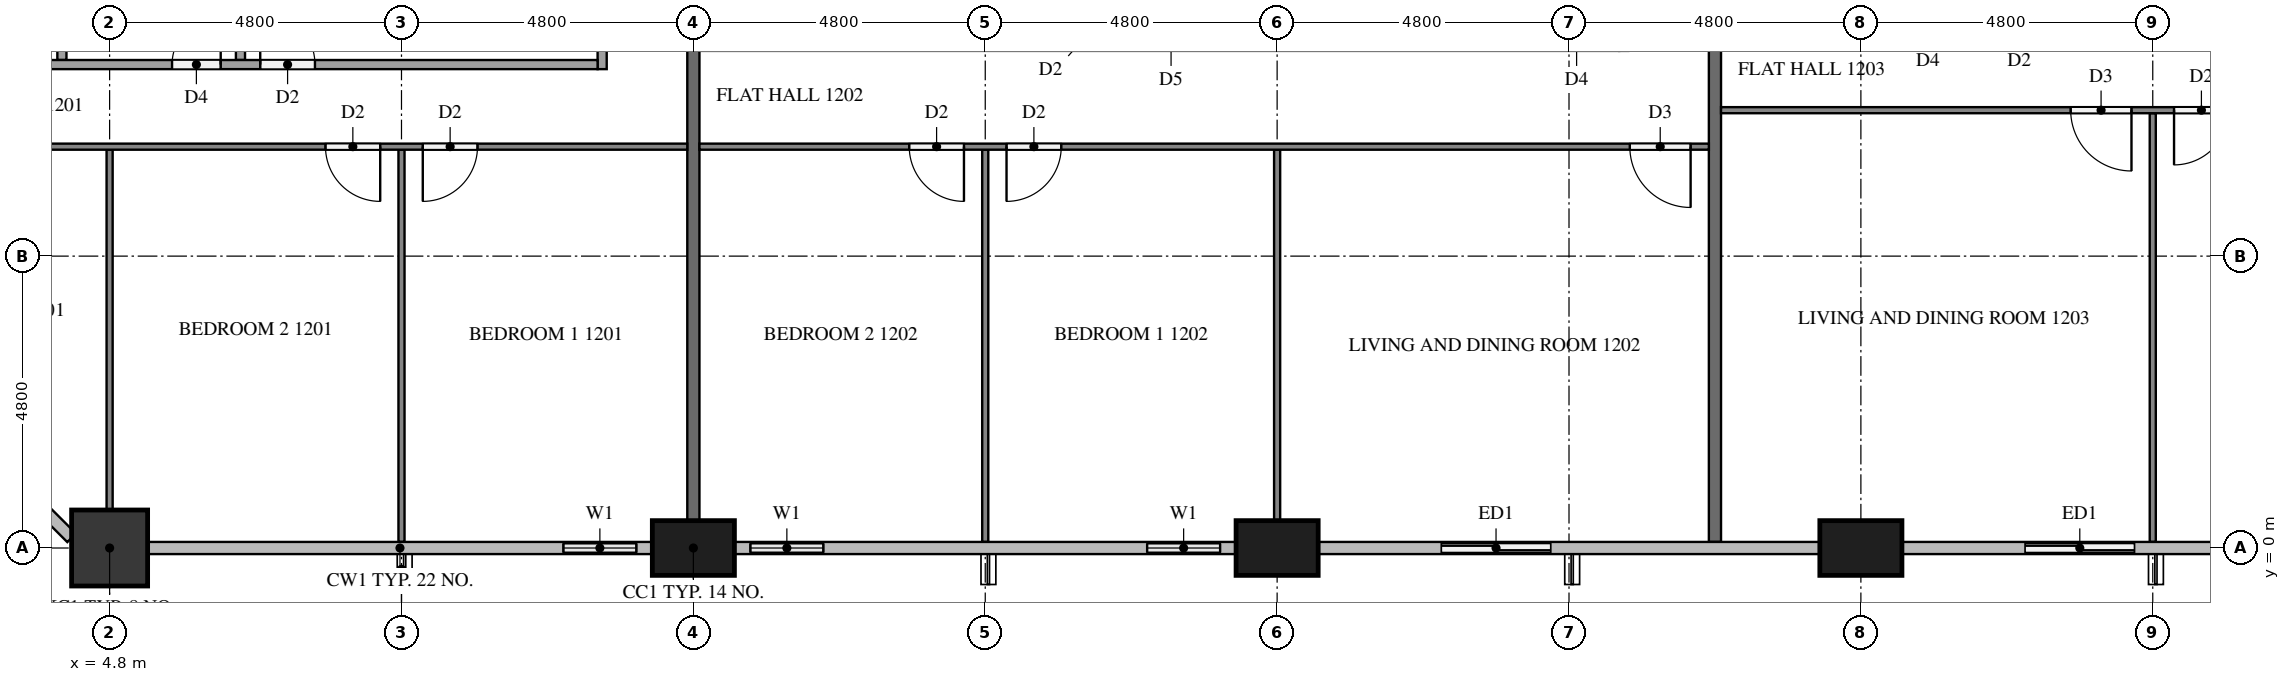
"""IFC4 building model, lengths in metres.
Left out: names, types, materials, properties, quantities, classifications, styles, units other than length and angle.
Written with IfcOpenShell. Run it as: python <this file> out.ifc"""

import sys

from ifc_helpers import new_model, si_unit, direction, frame, frame_2d, origin, origin_2d, place, context, subcontext, project, spatial, rectangle, extrude, element, fill, save


model = new_model("IFC4")
c1 = context("Model", 3, precision=1e-05, world=origin(), true_north=direction((0.0, 1.0)))
c2 = subcontext(c1, "Body", "Model", "MODEL_VIEW")
j1 = project(units=[si_unit("LENGTHUNIT", "METRE"), si_unit("PLANEANGLEUNIT", "RADIAN")], contexts=[c1])
p1 = place(None, origin())
s1 = spatial("IfcSite", under=j1, at=p1, CompositionType="ELEMENT")
p2 = place(p1, origin())
s2 = spatial("IfcBuilding", under=s1, at=p2, CompositionType="ELEMENT")
p3 = place(p2, frame((0.0, 0.0, 50.4)))
s3 = spatial("IfcBuildingStorey", under=s2, at=p3, CompositionType="ELEMENT", Elevation=50.4)
p4 = place(p3, frame((4.8, 0.0, 0.0), z_axis=(0.0, 0.0, 1.0), x_axis=(1.0, 0.0, 0.0)))
e1 = element("IfcColumn", 1, at=p4, inside=s3, PredefinedType="COLUMN", context=c2, shape_type="SweptSolid", body=[
    extrude(rectangle(XDim=1.25, YDim=1.25, at=origin_2d()), origin(), (0.0, 0.0, 1.0), 3.1),
])
for number, where, z_axis, x_axis in (
    (2, (14.4, 0.0, 0.0), (0.0, 0.0, 1.0), (1.0, 0.0, 0.0)),
    (3, (24.0, 0.0, 0.0), (0.0, 0.0, 1.0), (1.0, 0.0, 0.0)),
    (4, (33.6, 0.0, 0.0), (0.0, 0.0, 1.0), (1.0, 0.0, 0.0)),
):
    element("IfcColumn", number, at=place(p3, frame(where, z_axis=z_axis, x_axis=x_axis)), inside=s3, PredefinedType="COLUMN", context=c2, shape_type="SweptSolid", body=[
        extrude(rectangle(XDim=1.35, YDim=0.9, at=origin_2d()), origin(), (0.0, 0.0, 1.0), 3.1),
    ])
p5 = place(p3, frame((12.0, 0.0, 0.0), z_axis=(0.0, 0.0, 1.0), x_axis=(1.0, 0.0, 0.0)))
e5 = element("IfcWall", 5, at=p5, inside=s3, PredefinedType="SOLIDWALL", context=c2, shape_type="SweptSolid", body=[
    extrude(rectangle(XDim=1.725, YDim=0.15, at=frame_2d((0.863, 0.0))), origin(), (0.0, 0.0, 1.0), 3.1),
])
p6 = place(p5, frame((0.262, 0.0, 0.9)))
e6 = element("IfcOpeningElement", 6, at=p6, cuts=e5, PredefinedType="OPENING", context=c2, shape_type="SweptSolid", body=[
    extrude(rectangle(XDim=1.2, YDim=1.4, at=frame_2d((0.6, 0.7))), frame((0.0, 0.085, 0.0), z_axis=(0.0, -1.0, 0.0), x_axis=(1.0, 0.0, 0.0)), (0.0, 0.0, 1.0), 0.17),
])
p7 = place(p3, frame((15.075, 0.0, 0.0), z_axis=(0.0, 0.0, 1.0), x_axis=(1.0, 0.0, 0.0)))
e7 = element("IfcWall", 7, at=p7, inside=s3, PredefinedType="SOLIDWALL", context=c2, shape_type="SweptSolid", body=[
    extrude(rectangle(XDim=1.725, YDim=0.15, at=frame_2d((0.863, 0.0))), origin(), (0.0, 0.0, 1.0), 3.1),
])
p8 = place(p7, frame((0.262, 0.0, 0.9)))
e8 = element("IfcOpeningElement", 8, at=p8, cuts=e7, PredefinedType="OPENING", context=c2, shape_type="SweptSolid", body=[
    extrude(rectangle(XDim=1.2, YDim=1.4, at=frame_2d((0.6, 0.7))), frame((0.0, 0.085, 0.0), z_axis=(0.0, -1.0, 0.0), x_axis=(1.0, 0.0, 0.0)), (0.0, 0.0, 1.0), 0.17),
])
p9 = place(p3, frame((21.6, 0.0, 0.0), z_axis=(0.0, 0.0, 1.0), x_axis=(1.0, 0.0, 0.0)))
e9 = element("IfcWall", 9, at=p9, inside=s3, PredefinedType="SOLIDWALL", context=c2, shape_type="SweptSolid", body=[
    extrude(rectangle(XDim=1.725, YDim=0.15, at=frame_2d((0.862, 0.0))), origin(), (0.0, 0.0, 1.0), 3.1),
])
p10 = place(p9, frame((0.262, 0.0, 0.9)))
e10 = element("IfcOpeningElement", 10, at=p10, cuts=e9, PredefinedType="OPENING", context=c2, shape_type="SweptSolid", body=[
    extrude(rectangle(XDim=1.2, YDim=1.4, at=frame_2d((0.6, 0.7))), frame((0.0, 0.085, 0.0), z_axis=(0.0, -1.0, 0.0), x_axis=(1.0, 0.0, 0.0)), (0.0, 0.0, 1.0), 0.17),
])
p11 = place(p3, frame((26.4, 0.0, 0.0), z_axis=(0.0, 0.0, 1.0), x_axis=(1.0, 0.0, 0.0)))
e11 = element("IfcWall", 11, at=p11, inside=s3, PredefinedType="SOLIDWALL", context=c2, shape_type="SweptSolid", body=[
    extrude(rectangle(XDim=2.4, YDim=0.15, at=frame_2d((1.2, 0.0))), origin(), (0.0, 0.0, 1.0), 3.1),
])
p12 = place(p11, frame((0.3, 0.0, 0.0)))
e12 = element("IfcOpeningElement", 12, at=p12, cuts=e11, PredefinedType="OPENING", context=c2, shape_type="SweptSolid", body=[
    extrude(rectangle(XDim=1.8, YDim=2.4, at=frame_2d((0.9, 1.2))), frame((0.0, 0.085, 0.0), z_axis=(0.0, -1.0, 0.0), x_axis=(1.0, 0.0, 0.0)), (0.0, 0.0, 1.0), 0.17),
])
p13 = place(p3, frame((36.0, 0.0, 0.0), z_axis=(0.0, 0.0, 1.0), x_axis=(1.0, 0.0, 0.0)))
e13 = element("IfcWall", 13, at=p13, inside=s3, PredefinedType="SOLIDWALL", context=c2, shape_type="SweptSolid", body=[
    extrude(rectangle(XDim=2.4, YDim=0.15, at=frame_2d((1.2, 0.0))), origin(), (0.0, 0.0, 1.0), 3.1),
])
p14 = place(p13, frame((0.3, 0.0, 0.0)))
e14 = element("IfcOpeningElement", 14, at=p14, cuts=e13, PredefinedType="OPENING", context=c2, shape_type="SweptSolid", body=[
    extrude(rectangle(XDim=1.8, YDim=2.4, at=frame_2d((0.9, 1.2))), frame((0.0, 0.085, 0.0), z_axis=(0.0, -1.0, 0.0), x_axis=(1.0, 0.0, 0.0)), (0.0, 0.0, 1.0), 0.17),
])
p15 = place(p3, frame((14.4, 11.9, 0.0), z_axis=(0.0, 0.0, 1.0), x_axis=(0.0, -1.0, 0.0)))
e15 = element("IfcWall", 15, at=p15, inside=s3, PredefinedType="PARTITIONING", context=c2, shape_type="SweptSolid", body=[
    extrude(rectangle(XDim=11.45, YDim=0.2, at=frame_2d((5.725, 0.0))), origin(), (0.0, 0.0, 1.0), 3.1),
])
p16 = place(p3, frame((31.2, 11.9, 0.0), z_axis=(0.0, 0.0, 1.0), x_axis=(0.0, -1.0, 0.0)))
e16 = element("IfcWall", 16, at=p16, inside=s3, PredefinedType="PARTITIONING", context=c2, shape_type="SweptSolid", body=[
    extrude(rectangle(XDim=11.8, YDim=0.2, at=frame_2d((5.9, 0.0))), origin(), (0.0, 0.0, 1.0), 3.1),
])
p17 = place(p3, frame((9.6, 6.55, 0.0), z_axis=(0.0, 0.0, 1.0), x_axis=(0.0, -1.0, 0.0)))
e17 = element("IfcWall", 17, at=p17, inside=s3, PredefinedType="PARTITIONING", context=c2, shape_type="SweptSolid", body=[
    extrude(rectangle(XDim=6.45, YDim=0.1, at=frame_2d((3.225, 0.0))), origin(), (0.0, 0.0, 1.0), 3.1),
])
p18 = place(p3, frame((4.8, 6.55, 0.0), z_axis=(0.0, 0.0, 1.0), x_axis=(0.0, -1.0, 0.0)))
e18 = element("IfcWall", 18, at=p18, inside=s3, PredefinedType="PARTITIONING", context=c2, shape_type="SweptSolid", body=[
    extrude(rectangle(XDim=5.925, YDim=0.1, at=frame_2d((2.962, 0.0))), origin(), (0.0, 0.0, 1.0), 3.1),
])
p19 = place(p3, frame((14.3, 6.6, 0.0), z_axis=(0.0, 0.0, 1.0), x_axis=(-1.0, 0.0, 0.0)))
e19 = element("IfcWall", 19, at=p19, inside=s3, PredefinedType="PARTITIONING", context=c2, shape_type="SweptSolid", body=[
    extrude(rectangle(XDim=14.2, YDim=0.1, at=frame_2d((7.1, 0.0))), origin(), (0.0, 0.0, 1.0), 3.1),
])
p20 = place(p19, frame((3.45, 0.0, 0.0)))
e20 = element("IfcOpeningElement", 20, at=p20, cuts=e19, PredefinedType="OPENING", context=c2, shape_type="SweptSolid", body=[
    extrude(rectangle(XDim=0.9, YDim=2.1, at=frame_2d((0.45, 1.05))), frame((0.0, 0.06, 0.0), z_axis=(0.0, -1.0, 0.0), x_axis=(1.0, 0.0, 0.0)), (0.0, 0.0, 1.0), 0.12),
])
p21 = place(p19, frame((5.05, 0.0, 0.0)))
e21 = element("IfcOpeningElement", 21, at=p21, cuts=e19, PredefinedType="OPENING", context=c2, shape_type="SweptSolid", body=[
    extrude(rectangle(XDim=0.9, YDim=2.1, at=frame_2d((0.45, 1.05))), frame((0.0, 0.06, 0.0), z_axis=(0.0, -1.0, 0.0), x_axis=(1.0, 0.0, 0.0)), (0.0, 0.0, 1.0), 0.12),
])
p22 = place(p19, frame((12.6, 0.0, 0.0)))
e22 = element("IfcOpeningElement", 22, at=p22, cuts=e19, PredefinedType="OPENING", context=c2, shape_type="SweptSolid", body=[
    extrude(rectangle(XDim=1.0, YDim=2.1, at=frame_2d((0.5, 1.05))), frame((0.0, 0.06, 0.0), z_axis=(0.0, -1.0, 0.0), x_axis=(1.0, 0.0, 0.0)), (0.0, 0.0, 1.0), 0.12),
])
for number, where, z_axis, x_axis in (
    (23, (6.952, 11.9, 0.0), (0.0, 0.0, 1.0), (0.0, -1.0, 0.0)),
    (24, (4.015, 11.9, 0.0), (0.0, 0.0, 1.0), (0.0, -1.0, 0.0)),
):
    element("IfcWall", number, at=place(p3, frame(where, z_axis=z_axis, x_axis=x_axis)), inside=s3, PredefinedType="PARTITIONING", context=c2, shape_type="SweptSolid", body=[
        extrude(rectangle(XDim=3.875, YDim=0.15, at=frame_2d((1.938, 0.0))), origin(), (0.0, 0.0, 1.0), 3.1),
    ])
p23 = place(p3, frame((12.9, 11.9, 0.0), z_axis=(0.0, 0.0, 1.0), x_axis=(0.0, -1.0, 0.0)))
e25 = element("IfcWall", 25, at=p23, inside=s3, PredefinedType="PARTITIONING", context=c2, shape_type="SweptSolid", body=[
    extrude(rectangle(XDim=4.025, YDim=0.15, at=frame_2d((2.012, 0.0))), origin(), (0.0, 0.0, 1.0), 3.1),
])
p24 = place(p3, frame((0.1, 7.95, 0.0), z_axis=(0.0, 0.0, 1.0), x_axis=(1.0, 0.0, 0.0)))
e26 = element("IfcWall", 26, at=p24, inside=s3, PredefinedType="PARTITIONING", context=c2, shape_type="SweptSolid", body=[
    extrude(rectangle(XDim=12.725, YDim=0.15, at=frame_2d((6.362, 0.0))), origin(), (0.0, 0.0, 1.0), 3.1),
])
p25 = place(p24, frame((7.177, 0.0, 0.0)))
e27 = element("IfcOpeningElement", 27, at=p25, cuts=e26, PredefinedType="OPENING", context=c2, shape_type="SweptSolid", body=[
    extrude(rectangle(XDim=0.9, YDim=2.1, at=frame_2d((0.45, 1.05))), frame((0.0, 0.085, 0.0), z_axis=(0.0, -1.0, 0.0), x_axis=(1.0, 0.0, 0.0)), (0.0, 0.0, 1.0), 0.17),
])
p26 = place(p24, frame((5.727, 0.0, 0.0)))
e28 = element("IfcOpeningElement", 28, at=p26, cuts=e26, PredefinedType="OPENING", context=c2, shape_type="SweptSolid", body=[
    extrude(rectangle(XDim=0.8, YDim=2.1, at=frame_2d((0.4, 1.05))), frame((0.0, 0.085, 0.0), z_axis=(0.0, -1.0, 0.0), x_axis=(1.0, 0.0, 0.0)), (0.0, 0.0, 1.0), 0.17),
])
p27 = place(p24, frame((0.35, 0.0, 0.0)))
e29 = element("IfcOpeningElement", 29, at=p27, cuts=e26, PredefinedType="OPENING", context=c2, shape_type="SweptSolid", body=[
    extrude(rectangle(XDim=0.9, YDim=2.1, at=frame_2d((0.45, 1.05))), frame((0.0, 0.085, 0.0), z_axis=(0.0, -1.0, 0.0), x_axis=(1.0, 0.0, 0.0)), (0.0, 0.0, 1.0), 0.17),
])
p28 = place(p3, frame((24.0, 6.55, 0.0), z_axis=(0.0, 0.0, 1.0), x_axis=(0.0, -1.0, 0.0)))
e30 = element("IfcWall", 30, at=p28, inside=s3, PredefinedType="PARTITIONING", context=c2, shape_type="SweptSolid", body=[
    extrude(rectangle(XDim=6.1, YDim=0.1, at=frame_2d((3.05, 0.0))), origin(), (0.0, 0.0, 1.0), 3.1),
])
p29 = place(p3, frame((19.2, 6.55, 0.0), z_axis=(0.0, 0.0, 1.0), x_axis=(0.0, -1.0, 0.0)))
e31 = element("IfcWall", 31, at=p29, inside=s3, PredefinedType="PARTITIONING", context=c2, shape_type="SweptSolid", body=[
    extrude(rectangle(XDim=6.45, YDim=0.1, at=frame_2d((3.225, 0.0))), origin(), (0.0, 0.0, 1.0), 3.1),
])
p30 = place(p3, frame((31.1, 6.6, 0.0), z_axis=(0.0, 0.0, 1.0), x_axis=(-1.0, 0.0, 0.0)))
e32 = element("IfcWall", 32, at=p30, inside=s3, PredefinedType="PARTITIONING", context=c2, shape_type="SweptSolid", body=[
    extrude(rectangle(XDim=16.6, YDim=0.1, at=frame_2d((8.3, 0.0))), origin(), (0.0, 0.0, 1.0), 3.1),
])
p31 = place(p30, frame((0.3, 0.0, 0.0)))
e33 = element("IfcOpeningElement", 33, at=p31, cuts=e32, PredefinedType="OPENING", context=c2, shape_type="SweptSolid", body=[
    extrude(rectangle(XDim=1.0, YDim=2.1, at=frame_2d((0.5, 1.05))), frame((0.0, 0.06, 0.0), z_axis=(0.0, -1.0, 0.0), x_axis=(1.0, 0.0, 0.0)), (0.0, 0.0, 1.0), 0.12),
])
p32 = place(p30, frame((10.65, 0.0, 0.0)))
e34 = element("IfcOpeningElement", 34, at=p32, cuts=e32, PredefinedType="OPENING", context=c2, shape_type="SweptSolid", body=[
    extrude(rectangle(XDim=0.9, YDim=2.1, at=frame_2d((0.45, 1.05))), frame((0.0, 0.06, 0.0), z_axis=(0.0, -1.0, 0.0), x_axis=(1.0, 0.0, 0.0)), (0.0, 0.0, 1.0), 0.12),
])
p33 = place(p30, frame((12.25, 0.0, 0.0)))
e35 = element("IfcOpeningElement", 35, at=p33, cuts=e32, PredefinedType="OPENING", context=c2, shape_type="SweptSolid", body=[
    extrude(rectangle(XDim=0.9, YDim=2.1, at=frame_2d((0.45, 1.05))), frame((0.0, 0.06, 0.0), z_axis=(0.0, -1.0, 0.0), x_axis=(1.0, 0.0, 0.0)), (0.0, 0.0, 1.0), 0.12),
])
p34 = place(p3, frame((38.4, 7.15, 0.0), z_axis=(0.0, 0.0, 1.0), x_axis=(0.0, -1.0, 0.0)))
e36 = element("IfcWall", 36, at=p34, inside=s3, PredefinedType="PARTITIONING", context=c2, shape_type="SweptSolid", body=[
    extrude(rectangle(XDim=7.05, YDim=0.1, at=frame_2d((3.525, 0.0))), origin(), (0.0, 0.0, 1.0), 3.1),
])
p35 = place(p3, frame((43.1, 7.2, 0.0), z_axis=(0.0, 0.0, 1.0), x_axis=(-1.0, 0.0, 0.0)))
e37 = element("IfcWall", 37, at=p35, inside=s3, PredefinedType="PARTITIONING", context=c2, shape_type="SweptSolid", body=[
    extrude(rectangle(XDim=11.8, YDim=0.1, at=frame_2d((5.9, 0.0))), origin(), (0.0, 0.0, 1.0), 3.1),
])
p36 = place(p35, frame((3.45, 0.0, 0.0)))
e38 = element("IfcOpeningElement", 38, at=p36, cuts=e37, PredefinedType="OPENING", context=c2, shape_type="SweptSolid", body=[
    extrude(rectangle(XDim=0.9, YDim=2.1, at=frame_2d((0.45, 1.05))), frame((0.0, 0.06, 0.0), z_axis=(0.0, -1.0, 0.0), x_axis=(1.0, 0.0, 0.0)), (0.0, 0.0, 1.0), 0.12),
])
p37 = place(p35, frame((5.05, 0.0, 0.0)))
e39 = element("IfcOpeningElement", 39, at=p37, cuts=e37, PredefinedType="OPENING", context=c2, shape_type="SweptSolid", body=[
    extrude(rectangle(XDim=1.0, YDim=2.1, at=frame_2d((0.5, 1.05))), frame((0.0, 0.06, 0.0), z_axis=(0.0, -1.0, 0.0), x_axis=(1.0, 0.0, 0.0)), (0.0, 0.0, 1.0), 0.12),
])
p38 = place(p6, origin())
e40 = element("IfcWindow", 40, at=p38, inside=s3, PartitioningType="SINGLE_PANEL", PredefinedType="WINDOW", context=c2, shape_type="SweptSolid", body=[
    extrude(rectangle(XDim=1.2, YDim=1.4, at=frame_2d((0.6, 0.7))), frame((0.0, 0.03, 0.0), z_axis=(0.0, -1.0, 0.0), x_axis=(1.0, 0.0, 0.0)), (0.0, 0.0, 1.0), 0.06),
])
fill(e6, e40)
p39 = place(p8, origin())
e41 = element("IfcWindow", 41, at=p39, inside=s3, PartitioningType="SINGLE_PANEL", PredefinedType="WINDOW", context=c2, shape_type="SweptSolid", body=[
    extrude(rectangle(XDim=1.2, YDim=1.4, at=frame_2d((0.6, 0.7))), frame((0.0, 0.03, 0.0), z_axis=(0.0, -1.0, 0.0), x_axis=(1.0, 0.0, 0.0)), (0.0, 0.0, 1.0), 0.06),
])
fill(e8, e41)
p40 = place(p10, origin())
e42 = element("IfcWindow", 42, at=p40, inside=s3, PartitioningType="SINGLE_PANEL", PredefinedType="WINDOW", context=c2, shape_type="SweptSolid", body=[
    extrude(rectangle(XDim=1.2, YDim=1.4, at=frame_2d((0.6, 0.7))), frame((0.0, 0.03, 0.0), z_axis=(0.0, -1.0, 0.0), x_axis=(1.0, 0.0, 0.0)), (0.0, 0.0, 1.0), 0.06),
])
fill(e10, e42)
p41 = place(p12, origin())
e43 = element("IfcDoor", 43, at=p41, inside=s3, OperationType="SLIDING_TO_LEFT", PredefinedType="DOOR", context=c2, shape_type="SweptSolid", body=[
    extrude(rectangle(XDim=1.8, YDim=2.4, at=frame_2d((0.9, 1.2))), frame((0.0, 0.025, 0.0), z_axis=(0.0, -1.0, 0.0), x_axis=(1.0, 0.0, 0.0)), (0.0, 0.0, 1.0), 0.05),
])
fill(e12, e43)
p42 = place(p14, origin())
e44 = element("IfcDoor", 44, at=p42, inside=s3, OperationType="SLIDING_TO_RIGHT", PredefinedType="DOOR", context=c2, shape_type="SweptSolid", body=[
    extrude(rectangle(XDim=1.8, YDim=2.4, at=frame_2d((0.9, 1.2))), frame((0.0, 0.025, 0.0), z_axis=(0.0, -1.0, 0.0), x_axis=(1.0, 0.0, 0.0)), (0.0, 0.0, 1.0), 0.05),
])
fill(e14, e44)
p43 = place(p20, origin())
e45 = element("IfcDoor", 45, at=p43, inside=s3, OperationType="SINGLE_SWING_RIGHT", PredefinedType="DOOR", context=c2, shape_type="SweptSolid", body=[
    extrude(rectangle(XDim=0.9, YDim=2.1, at=frame_2d((0.45, 1.05))), frame((0.0, 0.025, 0.0), z_axis=(0.0, -1.0, 0.0), x_axis=(1.0, 0.0, 0.0)), (0.0, 0.0, 1.0), 0.05),
])
fill(e20, e45)
p44 = place(p21, origin())
e46 = element("IfcDoor", 46, at=p44, inside=s3, OperationType="SINGLE_SWING_LEFT", PredefinedType="DOOR", context=c2, shape_type="SweptSolid", body=[
    extrude(rectangle(XDim=0.9, YDim=2.1, at=frame_2d((0.45, 1.05))), frame((0.0, 0.025, 0.0), z_axis=(0.0, -1.0, 0.0), x_axis=(1.0, 0.0, 0.0)), (0.0, 0.0, 1.0), 0.05),
])
fill(e21, e46)
p45 = place(p25, origin())
e47 = element("IfcDoor", 47, at=p45, inside=s3, OperationType="SINGLE_SWING_LEFT", PredefinedType="DOOR", context=c2, shape_type="SweptSolid", body=[
    extrude(rectangle(XDim=0.9, YDim=2.1, at=frame_2d((0.45, 1.05))), frame((0.0, 0.025, 0.0), z_axis=(0.0, -1.0, 0.0), x_axis=(1.0, 0.0, 0.0)), (0.0, 0.0, 1.0), 0.05),
])
fill(e27, e47)
p46 = place(p26, origin())
e48 = element("IfcDoor", 48, at=p46, inside=s3, OperationType="SINGLE_SWING_RIGHT", PredefinedType="DOOR", context=c2, shape_type="SweptSolid", body=[
    extrude(rectangle(XDim=0.8, YDim=2.1, at=frame_2d((0.4, 1.05))), frame((0.0, 0.025, 0.0), z_axis=(0.0, -1.0, 0.0), x_axis=(1.0, 0.0, 0.0)), (0.0, 0.0, 1.0), 0.05),
])
fill(e28, e48)
p47 = place(p31, origin())
e49 = element("IfcDoor", 49, at=p47, inside=s3, OperationType="SINGLE_SWING_LEFT", PredefinedType="DOOR", context=c2, shape_type="SweptSolid", body=[
    extrude(rectangle(XDim=1.0, YDim=2.1, at=frame_2d((0.5, 1.05))), frame((0.0, 0.025, 0.0), z_axis=(0.0, -1.0, 0.0), x_axis=(1.0, 0.0, 0.0)), (0.0, 0.0, 1.0), 0.05),
])
fill(e33, e49)
p48 = place(p32, origin())
e50 = element("IfcDoor", 50, at=p48, inside=s3, OperationType="SINGLE_SWING_RIGHT", PredefinedType="DOOR", context=c2, shape_type="SweptSolid", body=[
    extrude(rectangle(XDim=0.9, YDim=2.1, at=frame_2d((0.45, 1.05))), frame((0.0, 0.025, 0.0), z_axis=(0.0, -1.0, 0.0), x_axis=(1.0, 0.0, 0.0)), (0.0, 0.0, 1.0), 0.05),
])
fill(e34, e50)
p49 = place(p33, origin())
e51 = element("IfcDoor", 51, at=p49, inside=s3, OperationType="SINGLE_SWING_LEFT", PredefinedType="DOOR", context=c2, shape_type="SweptSolid", body=[
    extrude(rectangle(XDim=0.9, YDim=2.1, at=frame_2d((0.45, 1.05))), frame((0.0, 0.025, 0.0), z_axis=(0.0, -1.0, 0.0), x_axis=(1.0, 0.0, 0.0)), (0.0, 0.0, 1.0), 0.05),
])
fill(e35, e51)
p50 = place(p36, origin())
e52 = element("IfcDoor", 52, at=p50, inside=s3, OperationType="SINGLE_SWING_RIGHT", PredefinedType="DOOR", context=c2, shape_type="SweptSolid", body=[
    extrude(rectangle(XDim=0.9, YDim=2.1, at=frame_2d((0.45, 1.05))), frame((0.0, 0.025, 0.0), z_axis=(0.0, -1.0, 0.0), x_axis=(1.0, 0.0, 0.0)), (0.0, 0.0, 1.0), 0.05),
])
fill(e38, e52)
p51 = place(p37, origin())
e53 = element("IfcDoor", 53, at=p51, inside=s3, OperationType="SINGLE_SWING_LEFT", PredefinedType="DOOR", context=c2, shape_type="SweptSolid", body=[
    extrude(rectangle(XDim=1.0, YDim=2.1, at=frame_2d((0.5, 1.05))), frame((0.0, 0.025, 0.0), z_axis=(0.0, -1.0, 0.0), x_axis=(1.0, 0.0, 0.0)), (0.0, 0.0, 1.0), 0.05),
])
fill(e39, e53)
save(model, sys.argv[1])
